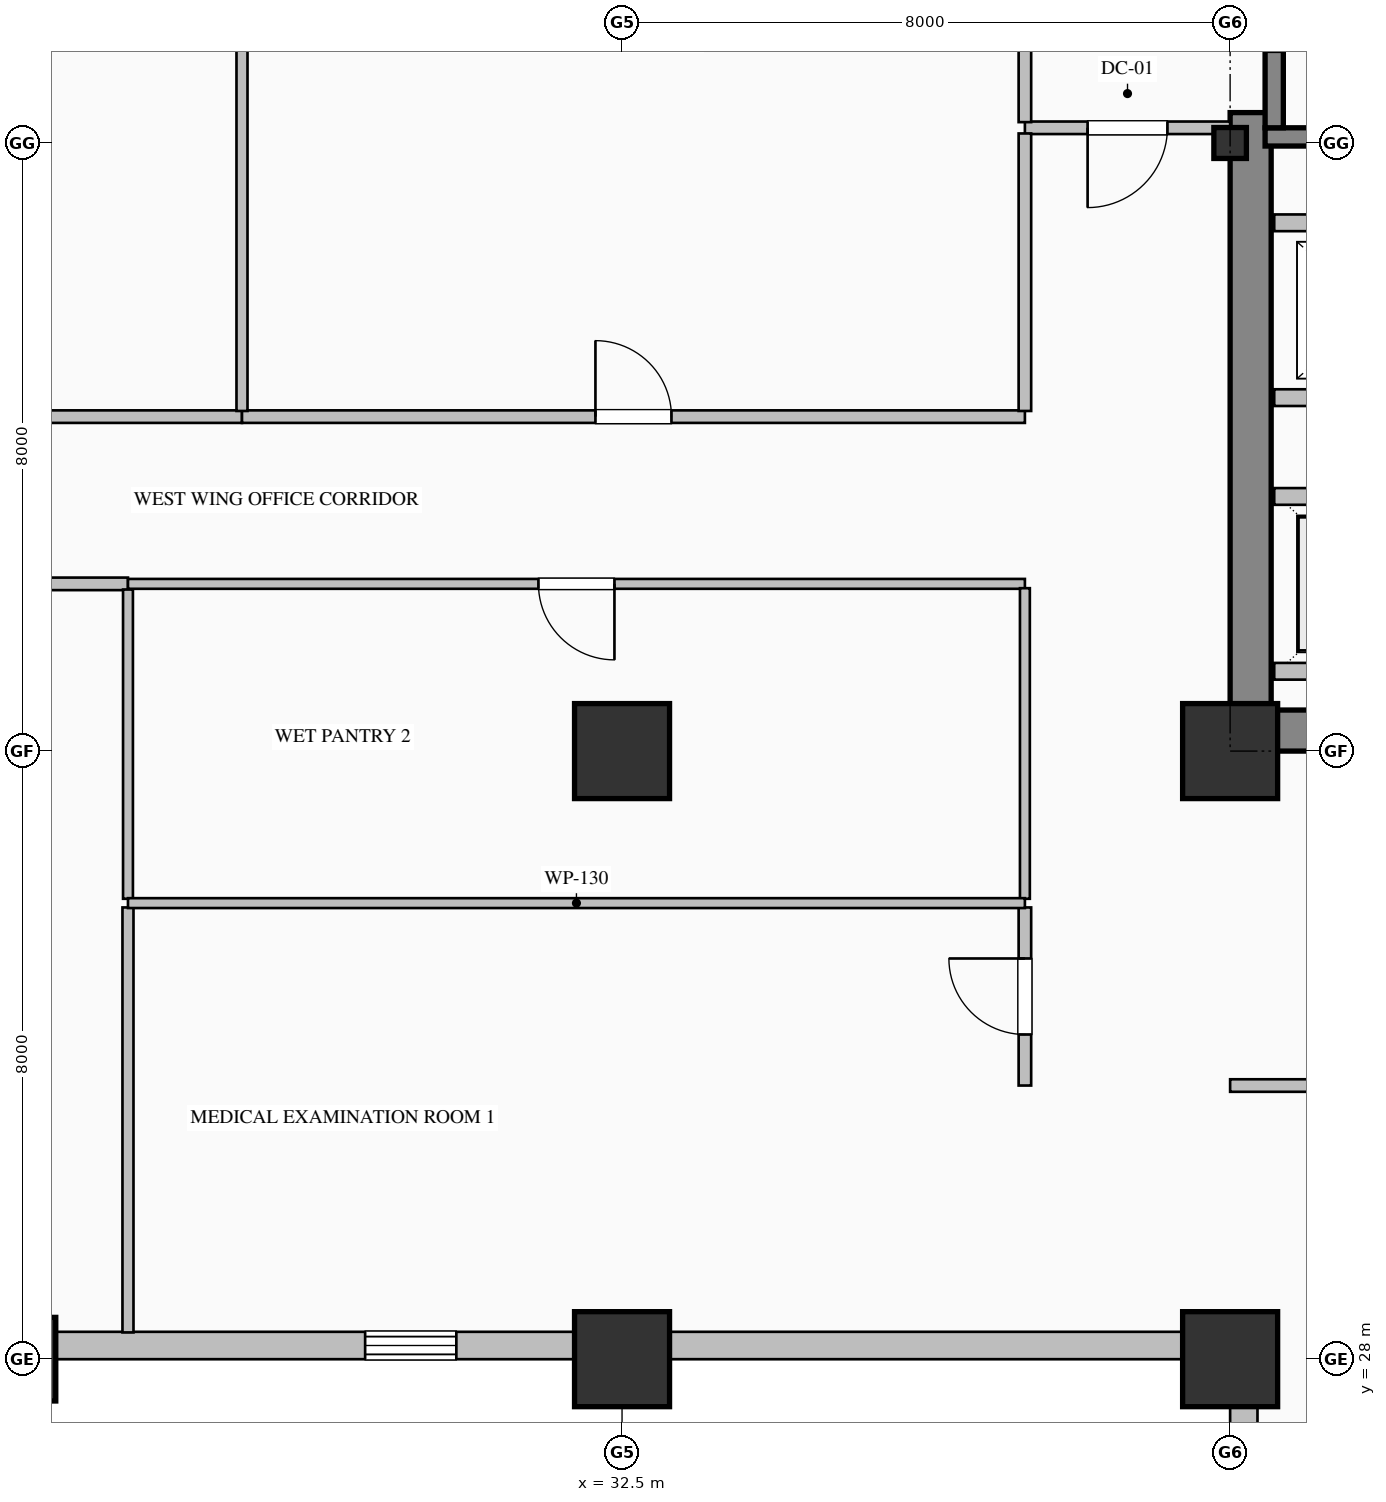
"""IFC4 building model, lengths in metres.
Left out: names, types, materials, properties, quantities, classifications, styles, units other than length and angle.
Written with IfcOpenShell. Run it as: python <this file> out.ifc"""

import sys

from ifc_helpers import new_model, si_unit, direction, frame, frame_2d, origin, origin_2d, place, context, subcontext, project, spatial, rectangle, hollow_rectangle, i_section, extrude, element, fill, save


model = new_model("IFC4")
c1 = context("Model", 3, precision=1e-05, world=origin(), true_north=direction((0.0, 1.0)))
c2 = subcontext(c1, "Body", "Model", "MODEL_VIEW")
j1 = project(units=[si_unit("LENGTHUNIT", "METRE"), si_unit("PLANEANGLEUNIT", "RADIAN")], contexts=[c1])
p1 = place(None, origin())
s1 = spatial("IfcSite", under=j1, at=p1, CompositionType="ELEMENT")
p2 = place(p1, origin())
s2 = spatial("IfcBuilding", under=s1, at=p2, CompositionType="ELEMENT")
p3 = place(p2, frame((0.0, 0.0, 84.2)))
s3 = spatial("IfcBuildingStorey", under=s2, at=p3, CompositionType="ELEMENT", Elevation=84.2)
p4 = place(p3, frame((40.77, 36.54, 0.0), z_axis=(0.0, 0.0, 1.0), x_axis=(0.0, 1.0, 0.0)))
e1 = element("IfcWall", 1, at=p4, inside=s3, PredefinedType="SHEAR", context=c2, shape_type="SweptSolid", body=[
    extrude(rectangle(XDim=7.86, YDim=0.54, at=frame_2d((3.93, 0.0))), origin(), (0.0, 0.0, 1.0), 3.75),
])
p5 = place(p3, frame((40.5, 36.27, 0.0), z_axis=(0.0, 0.0, 1.0), x_axis=(1.0, 0.0, 0.0)))
e2 = element("IfcWall", 2, at=p5, inside=s3, PredefinedType="SHEAR", context=c2, shape_type="SweptSolid", body=[
    extrude(rectangle(XDim=1.7, YDim=0.54, at=frame_2d((0.85, 0.0))), origin(), (0.0, 0.0, 1.0), 3.75),
])
p6 = place(p3, frame((24.5, 28.0, 0.0), z_axis=(0.0, 0.0, 1.0), x_axis=(1.0, 0.0, 0.0)))
e3 = element("IfcColumn", 3, at=p6, inside=s3, PredefinedType="COLUMN", context=c2, shape_type="SweptSolid", body=[
    extrude(hollow_rectangle(XDim=1.1, YDim=1.1, WallThickness=0.04, at=origin_2d()), origin(), (0.0, 0.0, 1.0), 4.0),
])
for number, where, z_axis, x_axis in (
    (4, (32.5, 28.0, 0.0), (0.0, 0.0, 1.0), (1.0, 0.0, 0.0)),
    (5, (32.5, 36.0, 0.0), (0.0, 0.0, 1.0), (1.0, 0.0, 0.0)),
    (6, (40.5, 28.0, 0.0), (0.0, 0.0, 1.0), (1.0, 0.0, 0.0)),
    (7, (40.5, 36.0, 0.0), (0.0, 0.0, 1.0), (1.0, 0.0, 0.0)),
):
    element("IfcColumn", number, at=place(p3, frame(where, z_axis=z_axis, x_axis=x_axis)), inside=s3, PredefinedType="COLUMN", context=c2, shape_type="SweptSolid", body=[
        extrude(hollow_rectangle(XDim=1.25, YDim=1.25, WallThickness=0.045, at=origin_2d()), origin(), (0.0, 0.0, 1.0), 4.0),
    ])
p7 = place(p3, frame((40.5, 44.0, 0.0), z_axis=(0.0, 0.0, 1.0), x_axis=(1.0, 0.0, 0.0)))
e8 = element("IfcColumn", 8, at=p7, inside=s3, PredefinedType="COLUMN", context=c2, shape_type="SweptSolid", body=[
    extrude(i_section(OverallWidth=0.407, OverallDepth=0.428, WebThickness=0.02, FlangeThickness=0.035, FilletRadius=0.022, at=origin_2d()), origin(), (0.0, 0.0, 1.0), 4.0),
])
p8 = place(p3, frame((40.68, 8.0, 0.0), z_axis=(0.0, 0.0, 1.0), x_axis=(0.0, 1.0, 0.0)))
e9 = element("IfcWall", 9, at=p8, inside=s3, PredefinedType="SOLIDWALL", context=c2, shape_type="SweptSolid", body=[
    extrude(rectangle(XDim=20.36, YDim=0.36, at=frame_2d((10.18, 0.0))), origin(), (0.0, 0.0, 1.0), 3.05),
])
p9 = place(p8, frame((6.6, 0.0, 0.7)))
e10 = element("IfcOpeningElement", 10, at=p9, cuts=e9, PredefinedType="OPENING", context=c2, shape_type="SweptSolid", body=[
    extrude(rectangle(XDim=1.2, YDim=1.85, at=frame_2d((0.6, 0.925))), frame((0.0, 0.19, 0.0), z_axis=(0.0, -1.0, 0.0), x_axis=(1.0, 0.0, 0.0)), (0.0, 0.0, 1.0), 0.38),
])
p10 = place(p8, frame((13.8, 0.0, 0.7)))
e11 = element("IfcOpeningElement", 11, at=p10, cuts=e9, PredefinedType="OPENING", context=c2, shape_type="SweptSolid", body=[
    extrude(rectangle(XDim=1.2, YDim=1.85, at=frame_2d((0.6, 0.925))), frame((0.0, 0.19, 0.0), z_axis=(0.0, -1.0, 0.0), x_axis=(1.0, 0.0, 0.0)), (0.0, 0.0, 1.0), 0.38),
])
p11 = place(p3, frame((40.52, 28.18, 0.0), z_axis=(0.0, 0.0, 1.0), x_axis=(-1.0, 0.0, 0.0)))
e12 = element("IfcWall", 12, at=p11, inside=s3, PredefinedType="SOLIDWALL", context=c2, shape_type="SweptSolid", body=[
    extrude(rectangle(XDim=36.52, YDim=0.36, at=frame_2d((18.26, 0.0))), origin(), (0.0, 0.0, 1.0), 3.05),
])
p12 = place(p11, frame((10.2, 0.0, 0.7)))
e13 = element("IfcOpeningElement", 13, at=p12, cuts=e12, PredefinedType="OPENING", context=c2, shape_type="SweptSolid", body=[
    extrude(rectangle(XDim=1.2, YDim=1.85, at=frame_2d((0.6, 0.925))), frame((0.0, 0.19, 0.0), z_axis=(0.0, -1.0, 0.0), x_axis=(1.0, 0.0, 0.0)), (0.0, 0.0, 1.0), 0.38),
])
p13 = place(p11, frame((17.4, 0.0, 0.7)))
e14 = element("IfcOpeningElement", 14, at=p13, cuts=e12, PredefinedType="OPENING", context=c2, shape_type="SweptSolid", body=[
    extrude(rectangle(XDim=1.2, YDim=1.85, at=frame_2d((0.6, 0.925))), frame((0.0, 0.19, 0.0), z_axis=(0.0, -1.0, 0.0), x_axis=(1.0, 0.0, 0.0)), (0.0, 0.0, 1.0), 0.38),
])
p14 = place(p11, frame((21.0, 0.0, 0.7)))
e15 = element("IfcOpeningElement", 15, at=p14, cuts=e12, PredefinedType="OPENING", context=c2, shape_type="SweptSolid", body=[
    extrude(rectangle(XDim=1.2, YDim=1.85, at=frame_2d((0.6, 0.925))), frame((0.0, 0.19, 0.0), z_axis=(0.0, -1.0, 0.0), x_axis=(1.0, 0.0, 0.0)), (0.0, 0.0, 1.0), 0.38),
])
p15 = place(p11, frame((28.2, 0.0, 0.7)))
e16 = element("IfcOpeningElement", 16, at=p15, cuts=e12, PredefinedType="OPENING", context=c2, shape_type="SweptSolid", body=[
    extrude(rectangle(XDim=1.2, YDim=1.85, at=frame_2d((0.6, 0.925))), frame((0.0, 0.19, 0.0), z_axis=(0.0, -1.0, 0.0), x_axis=(1.0, 0.0, 0.0)), (0.0, 0.0, 1.0), 0.38),
])
p16 = place(p3, frame((49.04, 44.08, 0.0), z_axis=(0.0, 0.0, 1.0), x_axis=(-1.0, 0.0, 0.0)))
e17 = element("IfcWall", 17, at=p16, inside=s3, PredefinedType="SOLIDWALL", context=c2, shape_type="SweptSolid", body=[
    extrude(rectangle(XDim=8.08, YDim=0.24, at=frame_2d((4.04, 0.0))), origin(), (0.0, 0.0, 1.0), 4.0),
])
p17 = place(p3, frame((41.08, 47.35, 0.0), z_axis=(0.0, 0.0, 1.0), x_axis=(0.0, -1.0, 0.0)))
e18 = element("IfcWall", 18, at=p17, inside=s3, PredefinedType="SOLIDWALL", context=c2, shape_type="SweptSolid", body=[
    extrude(rectangle(XDim=3.15, YDim=0.24, at=frame_2d((1.575, 0.0))), origin(), (0.0, 0.0, 1.0), 4.0),
])
p18 = place(p17, frame((1.0, 0.0, 0.0)))
e19 = element("IfcOpeningElement", 19, at=p18, cuts=e18, PredefinedType="OPENING", context=c2, shape_type="SweptSolid", body=[
    extrude(rectangle(XDim=1.15, YDim=2.2, at=frame_2d((0.575, 1.1))), frame((0.0, 0.13, 0.0), z_axis=(0.0, -1.0, 0.0), x_axis=(1.0, 0.0, 0.0)), (0.0, 0.0, 1.0), 0.26),
])
p19 = place(p3, frame((49.32, 37.05, 0.0), z_axis=(0.0, 0.0, 1.0), x_axis=(-1.0, 0.0, 0.0)))
e20 = element("IfcWall", 20, at=p19, inside=s3, PredefinedType="PARTITIONING", context=c2, shape_type="SweptSolid", body=[
    extrude(rectangle(XDim=8.24, YDim=0.22, at=frame_2d((4.12, 0.0))), origin(), (0.0, 0.0, 1.0), 3.75),
])
p20 = place(p19, frame((6.37, 0.0, 0.0)))
e21 = element("IfcOpeningElement", 21, at=p20, cuts=e20, PredefinedType="OPENING", context=c2, shape_type="SweptSolid", body=[
    extrude(rectangle(XDim=1.1, YDim=2.2, at=frame_2d((0.55, 1.1))), frame((0.0, 0.12, 0.0), z_axis=(0.0, -1.0, 0.0), x_axis=(1.0, 0.0, 0.0)), (0.0, 0.0, 1.0), 0.24),
])
p21 = place(p19, frame((3.57, 0.0, 0.0)))
e22 = element("IfcOpeningElement", 22, at=p21, cuts=e20, PredefinedType="OPENING", context=c2, shape_type="SweptSolid", body=[
    extrude(rectangle(XDim=1.1, YDim=2.2, at=frame_2d((0.55, 1.1))), frame((0.0, 0.12, 0.0), z_axis=(0.0, -1.0, 0.0), x_axis=(1.0, 0.0, 0.0)), (0.0, 0.0, 1.0), 0.24),
])
p22 = place(p19, frame((0.77, 0.0, 0.0)))
e23 = element("IfcOpeningElement", 23, at=p22, cuts=e20, PredefinedType="OPENING", context=c2, shape_type="SweptSolid", body=[
    extrude(rectangle(XDim=1.1, YDim=2.2, at=frame_2d((0.55, 1.1))), frame((0.0, 0.12, 0.0), z_axis=(0.0, -1.0, 0.0), x_axis=(1.0, 0.0, 0.0)), (0.0, 0.0, 1.0), 0.24),
])
for number, where, z_axis, x_axis in (
    (24, (41.08, 39.35, 0.0), (0.0, 0.0, 1.0), (1.0, 0.0, 0.0)),
    (25, (49.32, 40.65, 0.0), (0.0, 0.0, 1.0), (-1.0, 0.0, 0.0)),
    (26, (41.08, 42.95, 0.0), (0.0, 0.0, 1.0), (1.0, 0.0, 0.0)),
):
    element("IfcWall", number, at=place(p3, frame(where, z_axis=z_axis, x_axis=x_axis)), inside=s3, PredefinedType="PARTITIONING", context=c2, shape_type="SweptSolid", body=[
        extrude(rectangle(XDim=8.24, YDim=0.22, at=frame_2d((4.12, 0.0))), origin(), (0.0, 0.0, 1.0), 3.75),
    ])
p23 = place(p3, frame((40.5, 44.2, 0.0), z_axis=(0.0, 0.0, 1.0), x_axis=(-1.0, 0.0, 0.0)))
e27 = element("IfcWall", 27, at=p23, inside=s3, PredefinedType="PARTITIONING", context=c2, shape_type="SweptSolid", body=[
    extrude(rectangle(XDim=2.7, YDim=0.165, at=frame_2d((1.35, 0.0))), origin(), (0.0, 0.0, 1.0), 3.75),
])
p24 = place(p23, frame((0.825, 0.0, 0.0)))
e28 = element("IfcOpeningElement", 28, at=p24, cuts=e27, PredefinedType="OPENING", context=c2, shape_type="SweptSolid", body=[
    extrude(rectangle(XDim=1.05, YDim=2.15, at=frame_2d((0.525, 1.075))), frame((0.0, 0.093, 0.0), z_axis=(0.0, -1.0, 0.0), x_axis=(1.0, 0.0, 0.0)), (0.0, 0.0, 1.0), 0.185),
])
p25 = place(p3, frame((37.8, 44.274, 0.0), z_axis=(0.0, 0.0, 1.0), x_axis=(0.0, 1.0, 0.0)))
e29 = element("IfcWall", 29, at=p25, inside=s3, PredefinedType="PARTITIONING", context=c2, shape_type="SweptSolid", body=[
    extrude(rectangle(XDim=3.051, YDim=0.165, at=frame_2d((1.525, 0.0))), origin(), (0.0, 0.0, 1.0), 3.75),
])
p26 = place(p3, frame((20.5, 40.4, 0.0), z_axis=(0.0, 0.0, 1.0), x_axis=(1.0, 0.0, 0.0)))
e30 = element("IfcWall", 30, at=p26, inside=s3, PredefinedType="PARTITIONING", context=c2, shape_type="SweptSolid", body=[
    extrude(rectangle(XDim=7.0, YDim=0.165, at=frame_2d((3.5, 0.0))), origin(), (0.0, 0.0, 1.0), 3.75),
])
p27 = place(p26, frame((3.0, 0.0, 0.0)))
e31 = element("IfcOpeningElement", 31, at=p27, cuts=e30, PredefinedType="OPENING", context=c2, shape_type="SweptSolid", body=[
    extrude(rectangle(XDim=1.0, YDim=2.15, at=frame_2d((0.5, 1.075))), frame((0.0, 0.093, 0.0), z_axis=(0.0, -1.0, 0.0), x_axis=(1.0, 0.0, 0.0)), (0.0, 0.0, 1.0), 0.185),
])
p28 = place(p3, frame((27.5, 40.4, 0.0), z_axis=(0.0, 0.0, 1.0), x_axis=(1.0, 0.0, 0.0)))
e32 = element("IfcWall", 32, at=p28, inside=s3, PredefinedType="PARTITIONING", context=c2, shape_type="SweptSolid", body=[
    extrude(rectangle(XDim=10.3, YDim=0.165, at=frame_2d((5.15, 0.0))), origin(), (0.0, 0.0, 1.0), 3.75),
])
p29 = place(p28, frame((4.65, 0.0, 0.0)))
e33 = element("IfcOpeningElement", 33, at=p29, cuts=e32, PredefinedType="OPENING", context=c2, shape_type="SweptSolid", body=[
    extrude(rectangle(XDim=1.0, YDim=2.15, at=frame_2d((0.5, 1.075))), frame((0.0, 0.093, 0.0), z_axis=(0.0, -1.0, 0.0), x_axis=(1.0, 0.0, 0.0)), (0.0, 0.0, 1.0), 0.185),
])
p30 = place(p3, frame((26.0, 38.2, 0.0), z_axis=(0.0, 0.0, 1.0), x_axis=(-1.0, 0.0, 0.0)))
e34 = element("IfcWall", 34, at=p30, inside=s3, PredefinedType="PARTITIONING", context=c2, shape_type="SweptSolid", body=[
    extrude(rectangle(XDim=17.0, YDim=0.165, at=frame_2d((8.5, 0.0))), origin(), (0.0, 0.0, 1.0), 3.75),
])
p31 = place(p30, frame((7.5, 0.0, 0.0)))
e35 = element("IfcOpeningElement", 35, at=p31, cuts=e34, PredefinedType="OPENING", context=c2, shape_type="SweptSolid", body=[
    extrude(rectangle(XDim=2.0, YDim=2.4, at=frame_2d((1.0, 1.2))), frame((0.0, 0.093, 0.0), z_axis=(0.0, -1.0, 0.0), x_axis=(1.0, 0.0, 0.0)), (0.0, 0.0, 1.0), 0.185),
])
p32 = place(p3, frame((37.8, 38.2, 0.0), z_axis=(0.0, 0.0, 1.0), x_axis=(-1.0, 0.0, 0.0)))
e36 = element("IfcWall", 36, at=p32, inside=s3, PredefinedType="PARTITIONING", context=c2, shape_type="SweptSolid", body=[
    extrude(rectangle(XDim=11.8, YDim=0.13, at=frame_2d((5.9, 0.0))), origin(), (0.0, 0.0, 1.0), 3.75),
])
p33 = place(p32, frame((5.4, 0.0, 0.0)))
e37 = element("IfcOpeningElement", 37, at=p33, cuts=e36, PredefinedType="OPENING", context=c2, shape_type="SweptSolid", body=[
    extrude(rectangle(XDim=1.0, YDim=2.15, at=frame_2d((0.5, 1.075))), frame((0.0, 0.075, 0.0), z_axis=(0.0, -1.0, 0.0), x_axis=(1.0, 0.0, 0.0)), (0.0, 0.0, 1.0), 0.15),
])
p34 = place(p3, frame((37.8, 40.475, 0.0), z_axis=(0.0, 0.0, 1.0), x_axis=(0.0, 1.0, 0.0)))
e38 = element("IfcWall", 38, at=p34, inside=s3, PredefinedType="PARTITIONING", context=c2, shape_type="SweptSolid", body=[
    extrude(rectangle(XDim=3.651, YDim=0.165, at=frame_2d((1.825, 0.0))), origin(), (0.0, 0.0, 1.0), 3.75),
])
p35 = place(p3, frame((37.8, 31.6, 0.0), z_axis=(0.0, 0.0, 1.0), x_axis=(0.0, 1.0, 0.0)))
e39 = element("IfcWall", 39, at=p35, inside=s3, PredefinedType="PARTITIONING", context=c2, shape_type="SweptSolid", body=[
    extrude(rectangle(XDim=2.343, YDim=0.165, at=frame_2d((1.171, 0.0))), origin(), (0.0, 0.0, 1.0), 3.75),
])
p36 = place(p35, frame((0.671, 0.0, 0.0)))
e40 = element("IfcOpeningElement", 40, at=p36, cuts=e39, PredefinedType="OPENING", context=c2, shape_type="SweptSolid", body=[
    extrude(rectangle(XDim=1.0, YDim=2.15, at=frame_2d((0.5, 1.075))), frame((0.0, 0.093, 0.0), z_axis=(0.0, -1.0, 0.0), x_axis=(1.0, 0.0, 0.0)), (0.0, 0.0, 1.0), 0.185),
])
p37 = place(p3, frame((37.8, 34.057, 0.0), z_axis=(0.0, 0.0, 1.0), x_axis=(0.0, 1.0, 0.0)))
e41 = element("IfcWall", 41, at=p37, inside=s3, PredefinedType="PARTITIONING", context=c2, shape_type="SweptSolid", body=[
    extrude(rectangle(XDim=4.086, YDim=0.13, at=frame_2d((2.043, 0.0))), origin(), (0.0, 0.0, 1.0), 3.75),
])
p38 = place(p3, frame((43.0, 31.6, 0.0), z_axis=(0.0, 0.0, 1.0), x_axis=(-1.0, 0.0, 0.0)))
e42 = element("IfcWall", 42, at=p38, inside=s3, PredefinedType="PARTITIONING", context=c2, shape_type="SweptSolid", body=[
    extrude(rectangle(XDim=2.5, YDim=0.165, at=frame_2d((1.25, 0.0))), origin(), (0.0, 0.0, 1.0), 3.75),
])
p39 = place(p3, frame((27.5, 51.648, 0.0), z_axis=(0.0, 0.0, 1.0), x_axis=(0.0, -1.0, 0.0)))
e43 = element("IfcWall", 43, at=p39, inside=s3, PredefinedType="PARTITIONING", context=c2, shape_type="SweptSolid", body=[
    extrude(rectangle(XDim=11.173, YDim=0.145, at=frame_2d((5.587, 0.0))), origin(), (0.0, 0.0, 1.0), 3.75),
])
p40 = place(p3, frame((26.0, 33.943, 0.0), z_axis=(0.0, 0.0, 1.0), x_axis=(0.0, -1.0, 0.0)))
e44 = element("IfcWall", 44, at=p40, inside=s3, PredefinedType="PARTITIONING", context=c2, shape_type="SweptSolid", body=[
    extrude(rectangle(XDim=5.591, YDim=0.145, at=frame_2d((2.795, 0.0))), origin(), (0.0, 0.0, 1.0), 3.75),
])
p41 = place(p3, frame((26.0, 38.125, 0.0), z_axis=(0.0, 0.0, 1.0), x_axis=(0.0, -1.0, 0.0)))
e45 = element("IfcWall", 45, at=p41, inside=s3, PredefinedType="PARTITIONING", context=c2, shape_type="SweptSolid", body=[
    extrude(rectangle(XDim=4.069, YDim=0.13, at=frame_2d((2.034, 0.0))), origin(), (0.0, 0.0, 1.0), 3.75),
])
p42 = place(p3, frame((26.0, 34.0, 0.0), z_axis=(0.0, 0.0, 1.0), x_axis=(1.0, 0.0, 0.0)))
e46 = element("IfcWall", 46, at=p42, inside=s3, PredefinedType="PARTITIONING", context=c2, shape_type="SweptSolid", body=[
    extrude(rectangle(XDim=11.8, YDim=0.13, at=frame_2d((5.9, 0.0))), origin(), (0.0, 0.0, 1.0), 3.75),
])
p43 = place(p12, origin())
e47 = element("IfcWindow", 47, at=p43, inside=s3, PartitioningType="DOUBLE_PANEL_VERTICAL", PredefinedType="WINDOW", context=c2, shape_type="SweptSolid", body=[
    extrude(rectangle(XDim=1.2, YDim=1.85, at=frame_2d((0.6, 0.925))), frame((0.0, 0.15, 0.0), z_axis=(0.0, -1.0, 0.0), x_axis=(1.0, 0.0, 0.0)), (0.0, 0.0, 1.0), 0.06),
])
fill(e13, e47)
p44 = place(p24, origin())
e48 = element("IfcDoor", 48, at=p44, inside=s3, OperationType="SINGLE_SWING_RIGHT", PredefinedType="DOOR", context=c2, shape_type="SweptSolid", body=[
    extrude(rectangle(XDim=1.05, YDim=2.15, at=frame_2d((0.525, 1.075))), frame((0.0, 0.025, 0.0), z_axis=(0.0, -1.0, 0.0), x_axis=(1.0, 0.0, 0.0)), (0.0, 0.0, 1.0), 0.05),
])
fill(e28, e48)
p45 = place(p29, origin())
e49 = element("IfcDoor", 49, at=p45, inside=s3, OperationType="SINGLE_SWING_LEFT", PredefinedType="DOOR", context=c2, shape_type="SweptSolid", body=[
    extrude(rectangle(XDim=1.0, YDim=2.15, at=frame_2d((0.5, 1.075))), frame((0.0, 0.025, 0.0), z_axis=(0.0, -1.0, 0.0), x_axis=(1.0, 0.0, 0.0)), (0.0, 0.0, 1.0), 0.05),
])
fill(e33, e49)
p46 = place(p36, origin())
e50 = element("IfcDoor", 50, at=p46, inside=s3, OperationType="SINGLE_SWING_RIGHT", PredefinedType="DOOR", context=c2, shape_type="SweptSolid", body=[
    extrude(rectangle(XDim=1.0, YDim=2.15, at=frame_2d((0.5, 1.075))), frame((0.0, 0.025, 0.0), z_axis=(0.0, -1.0, 0.0), x_axis=(1.0, 0.0, 0.0)), (0.0, 0.0, 1.0), 0.05),
])
fill(e40, e50)
p47 = place(p33, origin())
e51 = element("IfcDoor", 51, at=p47, inside=s3, OperationType="SINGLE_SWING_LEFT", PredefinedType="DOOR", context=c2, shape_type="SweptSolid", body=[
    extrude(rectangle(XDim=1.0, YDim=2.15, at=frame_2d((0.5, 1.075))), frame((0.0, 0.025, 0.0), z_axis=(0.0, -1.0, 0.0), x_axis=(1.0, 0.0, 0.0)), (0.0, 0.0, 1.0), 0.05),
])
fill(e37, e51)
save(model, sys.argv[1])
